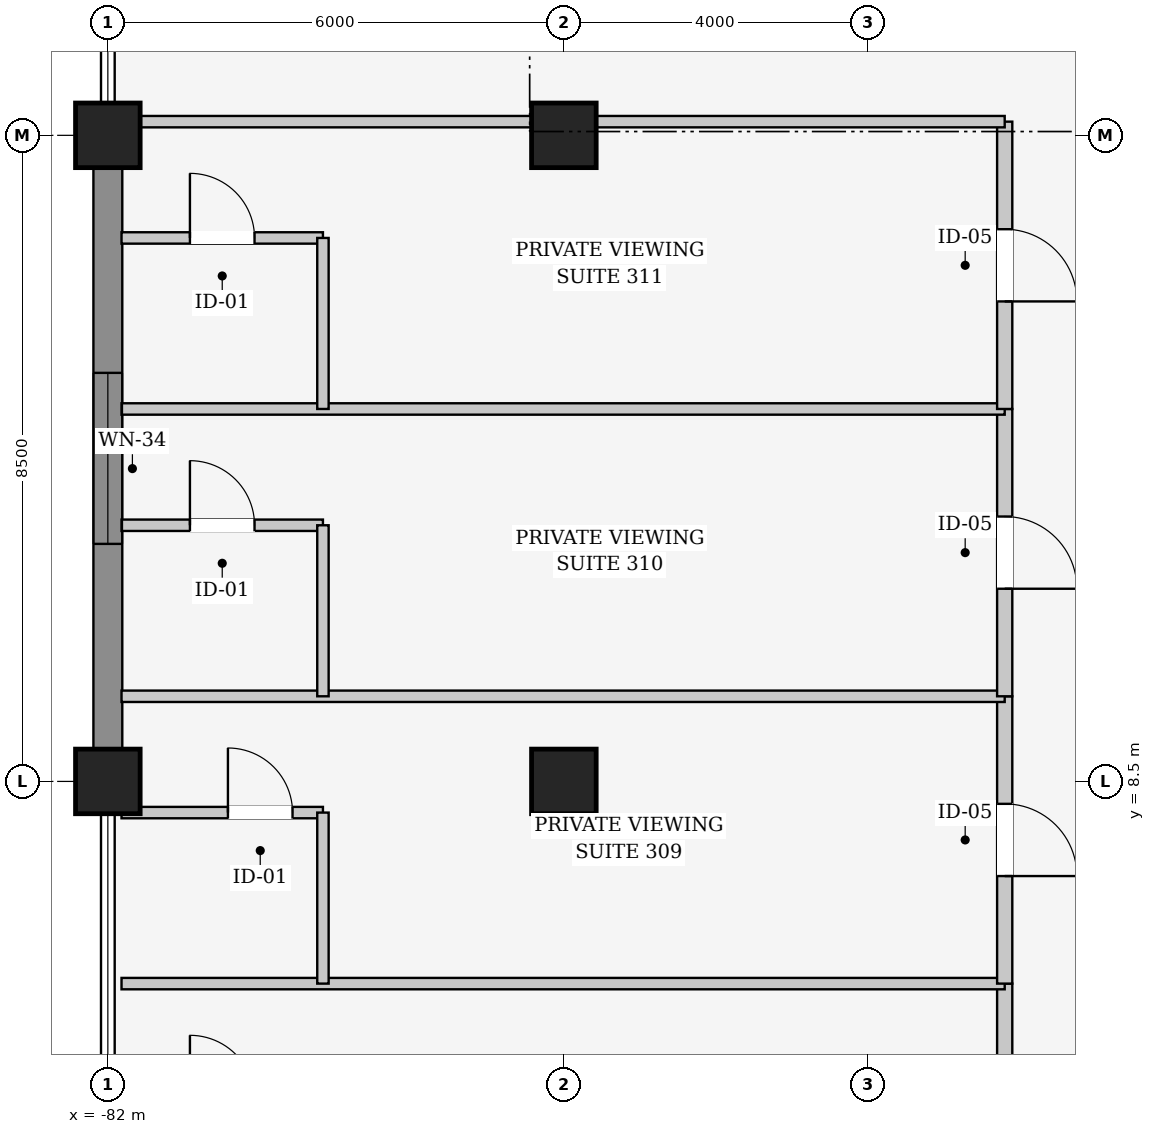
"""IFC4 building model, lengths in metres.
Left out: names, types, materials, properties, quantities, classifications, styles, units other than length and angle.
Written with IfcOpenShell. Run it as: python <this file> out.ifc"""

import sys

from ifc_helpers import new_model, si_unit, direction, frame, frame_2d, origin, origin_2d, place, context, subcontext, project, spatial, rectangle, extrude, element, fill, save


model = new_model("IFC4")
c1 = context("Model", 3, precision=1e-05, world=origin(), true_north=direction((0.0, 1.0)))
c2 = subcontext(c1, "Body", "Model", "MODEL_VIEW")
j1 = project(units=[si_unit("LENGTHUNIT", "METRE"), si_unit("PLANEANGLEUNIT", "RADIAN")], contexts=[c1])
p1 = place(None, origin())
s1 = spatial("IfcSite", under=j1, at=p1, CompositionType="ELEMENT")
p2 = place(p1, origin())
s2 = spatial("IfcBuilding", under=s1, at=p2, CompositionType="ELEMENT")
p3 = place(p2, frame((0.0, 0.0, 16.2)))
s3 = spatial("IfcBuildingStorey", under=s2, at=p3, CompositionType="ELEMENT", Elevation=16.2)
for number, where, z_axis, x_axis in (
    (1, (-82.0, 8.5, 0.0), (0.0, 0.0, 1.0), (1.0, 0.0, 0.0)),
    (2, (-82.0, 17.0, 0.0), (0.0, 0.0, 1.0), (1.0, 0.0, 0.0)),
    (3, (-76.0, 8.5, 0.0), (0.0, 0.0, 1.0), (1.0, 0.0, 0.0)),
    (4, (-76.0, 17.0, 0.0), (0.0, 0.0, 1.0), (1.0, 0.0, 0.0)),
):
    element("IfcColumn", number, at=place(p3, frame(where, z_axis=z_axis, x_axis=x_axis)), inside=s3, PredefinedType="COLUMN", context=c2, shape_type="SweptSolid", body=[
        extrude(rectangle(XDim=0.85, YDim=0.85, at=origin_2d()), origin(), (0.0, 0.0, 1.0), 4.8),
    ])
p4 = place(p3, frame((-82.0, 8.907, 0.0), z_axis=(0.0, 0.0, 1.0), x_axis=(0.0, 1.0, 0.0)))
e5 = element("IfcWall", 5, at=p4, inside=s3, PredefinedType="SOLIDWALL", context=c2, shape_type="SweptSolid", body=[
    extrude(rectangle(XDim=7.686, YDim=0.38, at=frame_2d((3.843, 0.0))), origin(), (0.0, 0.0, 1.0), 3.76),
])
p5 = place(p4, frame((2.718, 0.0, 0.9)))
e6 = element("IfcOpeningElement", 6, at=p5, cuts=e5, PredefinedType="OPENING", context=c2, shape_type="SweptSolid", body=[
    extrude(rectangle(XDim=2.25, YDim=2.0, at=frame_2d((1.125, 1.0))), frame((0.0, 0.2, 0.0), z_axis=(0.0, -1.0, 0.0), x_axis=(1.0, 0.0, 0.0)), (0.0, 0.0, 1.0), 0.4),
])
p6 = place(p3, frame((-70.2, 5.84, 0.0), z_axis=(0.0, 0.0, 1.0), x_axis=(0.0, -1.0, 0.0)))
e7 = element("IfcWall", 7, at=p6, inside=s3, PredefinedType="PARTITIONING", context=c2, shape_type="SweptSolid", body=[
    extrude(rectangle(XDim=3.78, YDim=0.2, at=frame_2d((1.89, 0.0))), origin(), (0.0, 0.0, 1.0), 4.182),
])
p7 = place(p6, frame((1.415, 0.0, 0.0)))
e8 = element("IfcOpeningElement", 8, at=p7, cuts=e7, PredefinedType="OPENING", context=c2, shape_type="SweptSolid", body=[
    extrude(rectangle(XDim=0.95, YDim=2.25, at=frame_2d((0.475, 1.125))), frame((0.0, 0.11, 0.0), z_axis=(0.0, -1.0, 0.0), x_axis=(1.0, 0.0, 0.0)), (0.0, 0.0, 1.0), 0.22),
])
p8 = place(p3, frame((-81.82, 5.84, 0.0), z_axis=(0.0, 0.0, 1.0), x_axis=(1.0, 0.0, 0.0)))
e9 = element("IfcWall", 9, at=p8, inside=s3, PredefinedType="PARTITIONING", context=c2, shape_type="SweptSolid", body=[
    extrude(rectangle(XDim=11.62, YDim=0.15, at=frame_2d((5.81, 0.0))), origin(), (0.0, 0.0, 1.0), 3.845),
])
p9 = place(p3, frame((-81.82, 8.09, 0.0), z_axis=(0.0, 0.0, 1.0), x_axis=(1.0, 0.0, 0.0)))
e10 = element("IfcWall", 10, at=p9, inside=s3, PredefinedType="PARTITIONING", context=c2, shape_type="SweptSolid", body=[
    extrude(rectangle(XDim=2.65, YDim=0.15, at=frame_2d((1.325, 0.0))), origin(), (0.0, 0.0, 1.0), 3.745),
])
p10 = place(p9, frame((1.4, 0.0, 0.0)))
e11 = element("IfcOpeningElement", 11, at=p10, cuts=e10, PredefinedType="OPENING", context=c2, shape_type="SweptSolid", body=[
    extrude(rectangle(XDim=0.85, YDim=2.15, at=frame_2d((0.425, 1.075))), frame((0.0, 0.085, 0.0), z_axis=(0.0, -1.0, 0.0), x_axis=(1.0, 0.0, 0.0)), (0.0, 0.0, 1.0), 0.17),
])
p11 = place(p3, frame((-79.17, 8.09, 0.0), z_axis=(0.0, 0.0, 1.0), x_axis=(0.0, -1.0, 0.0)))
e12 = element("IfcWall", 12, at=p11, inside=s3, PredefinedType="PARTITIONING", context=c2, shape_type="SweptSolid", body=[
    extrude(rectangle(XDim=2.25, YDim=0.15, at=frame_2d((1.125, 0.0))), origin(), (0.0, 0.0, 1.0), 3.745),
])
p12 = place(p3, frame((-70.2, 9.62, 0.0), z_axis=(0.0, 0.0, 1.0), x_axis=(0.0, -1.0, 0.0)))
e13 = element("IfcWall", 13, at=p12, inside=s3, PredefinedType="PARTITIONING", context=c2, shape_type="SweptSolid", body=[
    extrude(rectangle(XDim=3.78, YDim=0.2, at=frame_2d((1.89, 0.0))), origin(), (0.0, 0.0, 1.0), 3.545),
])
p13 = place(p12, frame((1.415, 0.0, 0.0)))
e14 = element("IfcOpeningElement", 14, at=p13, cuts=e13, PredefinedType="OPENING", context=c2, shape_type="SweptSolid", body=[
    extrude(rectangle(XDim=0.95, YDim=2.25, at=frame_2d((0.475, 1.125))), frame((0.0, 0.11, 0.0), z_axis=(0.0, -1.0, 0.0), x_axis=(1.0, 0.0, 0.0)), (0.0, 0.0, 1.0), 0.22),
])
p14 = place(p3, frame((-81.82, 9.62, 0.0), z_axis=(0.0, 0.0, 1.0), x_axis=(1.0, 0.0, 0.0)))
e15 = element("IfcWall", 15, at=p14, inside=s3, PredefinedType="PARTITIONING", context=c2, shape_type="SweptSolid", body=[
    extrude(rectangle(XDim=11.62, YDim=0.15, at=frame_2d((5.81, 0.0))), origin(), (0.0, 0.0, 1.0), 3.845),
])
p15 = place(p3, frame((-81.82, 11.87, 0.0), z_axis=(0.0, 0.0, 1.0), x_axis=(1.0, 0.0, 0.0)))
e16 = element("IfcWall", 16, at=p15, inside=s3, PredefinedType="PARTITIONING", context=c2, shape_type="SweptSolid", body=[
    extrude(rectangle(XDim=2.65, YDim=0.15, at=frame_2d((1.325, 0.0))), origin(), (0.0, 0.0, 1.0), 3.845),
])
p16 = place(p15, frame((0.9, 0.0, 0.0)))
e17 = element("IfcOpeningElement", 17, at=p16, cuts=e16, PredefinedType="OPENING", context=c2, shape_type="SweptSolid", body=[
    extrude(rectangle(XDim=0.85, YDim=2.15, at=frame_2d((0.425, 1.075))), frame((0.0, 0.085, 0.0), z_axis=(0.0, -1.0, 0.0), x_axis=(1.0, 0.0, 0.0)), (0.0, 0.0, 1.0), 0.17),
])
p17 = place(p3, frame((-79.17, 11.87, 0.0), z_axis=(0.0, 0.0, 1.0), x_axis=(0.0, -1.0, 0.0)))
e18 = element("IfcWall", 18, at=p17, inside=s3, PredefinedType="PARTITIONING", context=c2, shape_type="SweptSolid", body=[
    extrude(rectangle(XDim=2.25, YDim=0.15, at=frame_2d((1.125, 0.0))), origin(), (0.0, 0.0, 1.0), 4.44),
])
p18 = place(p3, frame((-70.2, 13.4, 0.0), z_axis=(0.0, 0.0, 1.0), x_axis=(0.0, -1.0, 0.0)))
e19 = element("IfcWall", 19, at=p18, inside=s3, PredefinedType="PARTITIONING", context=c2, shape_type="SweptSolid", body=[
    extrude(rectangle(XDim=3.78, YDim=0.2, at=frame_2d((1.89, 0.0))), origin(), (0.0, 0.0, 1.0), 4.182),
])
p19 = place(p18, frame((1.415, 0.0, 0.0)))
e20 = element("IfcOpeningElement", 20, at=p19, cuts=e19, PredefinedType="OPENING", context=c2, shape_type="SweptSolid", body=[
    extrude(rectangle(XDim=0.95, YDim=2.25, at=frame_2d((0.475, 1.125))), frame((0.0, 0.11, 0.0), z_axis=(0.0, -1.0, 0.0), x_axis=(1.0, 0.0, 0.0)), (0.0, 0.0, 1.0), 0.22),
])
p20 = place(p3, frame((-81.82, 13.4, 0.0), z_axis=(0.0, 0.0, 1.0), x_axis=(1.0, 0.0, 0.0)))
e21 = element("IfcWall", 21, at=p20, inside=s3, PredefinedType="PARTITIONING", context=c2, shape_type="SweptSolid", body=[
    extrude(rectangle(XDim=11.62, YDim=0.15, at=frame_2d((5.81, 0.0))), origin(), (0.0, 0.0, 1.0), 3.845),
])
p21 = place(p3, frame((-81.82, 15.65, 0.0), z_axis=(0.0, 0.0, 1.0), x_axis=(1.0, 0.0, 0.0)))
e22 = element("IfcWall", 22, at=p21, inside=s3, PredefinedType="PARTITIONING", context=c2, shape_type="SweptSolid", body=[
    extrude(rectangle(XDim=2.65, YDim=0.15, at=frame_2d((1.325, 0.0))), origin(), (0.0, 0.0, 1.0), 3.845),
])
p22 = place(p21, frame((0.9, 0.0, 0.0)))
e23 = element("IfcOpeningElement", 23, at=p22, cuts=e22, PredefinedType="OPENING", context=c2, shape_type="SweptSolid", body=[
    extrude(rectangle(XDim=0.85, YDim=2.15, at=frame_2d((0.425, 1.075))), frame((0.0, 0.085, 0.0), z_axis=(0.0, -1.0, 0.0), x_axis=(1.0, 0.0, 0.0)), (0.0, 0.0, 1.0), 0.17),
])
p23 = place(p3, frame((-79.17, 15.65, 0.0), z_axis=(0.0, 0.0, 1.0), x_axis=(0.0, -1.0, 0.0)))
e24 = element("IfcWall", 24, at=p23, inside=s3, PredefinedType="PARTITIONING", context=c2, shape_type="SweptSolid", body=[
    extrude(rectangle(XDim=2.25, YDim=0.15, at=frame_2d((1.125, 0.0))), origin(), (0.0, 0.0, 1.0), 4.44),
])
p24 = place(p3, frame((-70.2, 17.18, 0.0), z_axis=(0.0, 0.0, 1.0), x_axis=(0.0, -1.0, 0.0)))
e25 = element("IfcWall", 25, at=p24, inside=s3, PredefinedType="PARTITIONING", context=c2, shape_type="SweptSolid", body=[
    extrude(rectangle(XDim=3.78, YDim=0.2, at=frame_2d((1.89, 0.0))), origin(), (0.0, 0.0, 1.0), 3.545),
])
p25 = place(p24, frame((1.415, 0.0, 0.0)))
e26 = element("IfcOpeningElement", 26, at=p25, cuts=e25, PredefinedType="OPENING", context=c2, shape_type="SweptSolid", body=[
    extrude(rectangle(XDim=0.95, YDim=2.25, at=frame_2d((0.475, 1.125))), frame((0.0, 0.11, 0.0), z_axis=(0.0, -1.0, 0.0), x_axis=(1.0, 0.0, 0.0)), (0.0, 0.0, 1.0), 0.22),
])
p26 = place(p3, frame((-81.82, 17.18, 0.0), z_axis=(0.0, 0.0, 1.0), x_axis=(1.0, 0.0, 0.0)))
e27 = element("IfcWall", 27, at=p26, inside=s3, PredefinedType="PARTITIONING", context=c2, shape_type="SweptSolid", body=[
    extrude(rectangle(XDim=11.62, YDim=0.15, at=frame_2d((5.81, 0.0))), origin(), (0.0, 0.0, 1.0), 3.545),
])
p27 = place(p5, origin())
e28 = element("IfcWindow", 28, at=p27, inside=s3, PartitioningType="SINGLE_PANEL", PredefinedType="WINDOW", context=c2, shape_type="SweptSolid", body=[
    extrude(rectangle(XDim=2.25, YDim=2.0, at=frame_2d((1.125, 1.0))), frame((0.0, 0.03, 0.0), z_axis=(0.0, -1.0, 0.0), x_axis=(1.0, 0.0, 0.0)), (0.0, 0.0, 1.0), 0.06),
])
fill(e6, e28)
p28 = place(p10, origin())
e29 = element("IfcDoor", 29, at=p28, inside=s3, OperationType="SINGLE_SWING_LEFT", PredefinedType="DOOR", context=c2, shape_type="SweptSolid", body=[
    extrude(rectangle(XDim=0.85, YDim=2.15, at=frame_2d((0.425, 1.075))), frame((0.0, 0.025, 0.0), z_axis=(0.0, -1.0, 0.0), x_axis=(1.0, 0.0, 0.0)), (0.0, 0.0, 1.0), 0.05),
])
fill(e11, e29)
p29 = place(p13, origin())
e30 = element("IfcDoor", 30, at=p29, inside=s3, OperationType="SINGLE_SWING_RIGHT", PredefinedType="DOOR", context=c2, shape_type="SweptSolid", body=[
    extrude(rectangle(XDim=0.95, YDim=2.25, at=frame_2d((0.475, 1.125))), frame((0.0, 0.025, 0.0), z_axis=(0.0, -1.0, 0.0), x_axis=(1.0, 0.0, 0.0)), (0.0, 0.0, 1.0), 0.05),
])
fill(e14, e30)
p30 = place(p16, origin())
e31 = element("IfcDoor", 31, at=p30, inside=s3, OperationType="SINGLE_SWING_LEFT", PredefinedType="DOOR", context=c2, shape_type="SweptSolid", body=[
    extrude(rectangle(XDim=0.85, YDim=2.15, at=frame_2d((0.425, 1.075))), frame((0.0, 0.025, 0.0), z_axis=(0.0, -1.0, 0.0), x_axis=(1.0, 0.0, 0.0)), (0.0, 0.0, 1.0), 0.05),
])
fill(e17, e31)
p31 = place(p19, origin())
e32 = element("IfcDoor", 32, at=p31, inside=s3, OperationType="SINGLE_SWING_RIGHT", PredefinedType="DOOR", context=c2, shape_type="SweptSolid", body=[
    extrude(rectangle(XDim=0.95, YDim=2.25, at=frame_2d((0.475, 1.125))), frame((0.0, 0.025, 0.0), z_axis=(0.0, -1.0, 0.0), x_axis=(1.0, 0.0, 0.0)), (0.0, 0.0, 1.0), 0.05),
])
fill(e20, e32)
p32 = place(p22, origin())
e33 = element("IfcDoor", 33, at=p32, inside=s3, OperationType="SINGLE_SWING_LEFT", PredefinedType="DOOR", context=c2, shape_type="SweptSolid", body=[
    extrude(rectangle(XDim=0.85, YDim=2.15, at=frame_2d((0.425, 1.075))), frame((0.0, 0.025, 0.0), z_axis=(0.0, -1.0, 0.0), x_axis=(1.0, 0.0, 0.0)), (0.0, 0.0, 1.0), 0.05),
])
fill(e23, e33)
p33 = place(p25, origin())
e34 = element("IfcDoor", 34, at=p33, inside=s3, OperationType="SINGLE_SWING_RIGHT", PredefinedType="DOOR", context=c2, shape_type="SweptSolid", body=[
    extrude(rectangle(XDim=0.95, YDim=2.25, at=frame_2d((0.475, 1.125))), frame((0.0, 0.025, 0.0), z_axis=(0.0, -1.0, 0.0), x_axis=(1.0, 0.0, 0.0)), (0.0, 0.0, 1.0), 0.05),
])
fill(e26, e34)
save(model, sys.argv[1])
